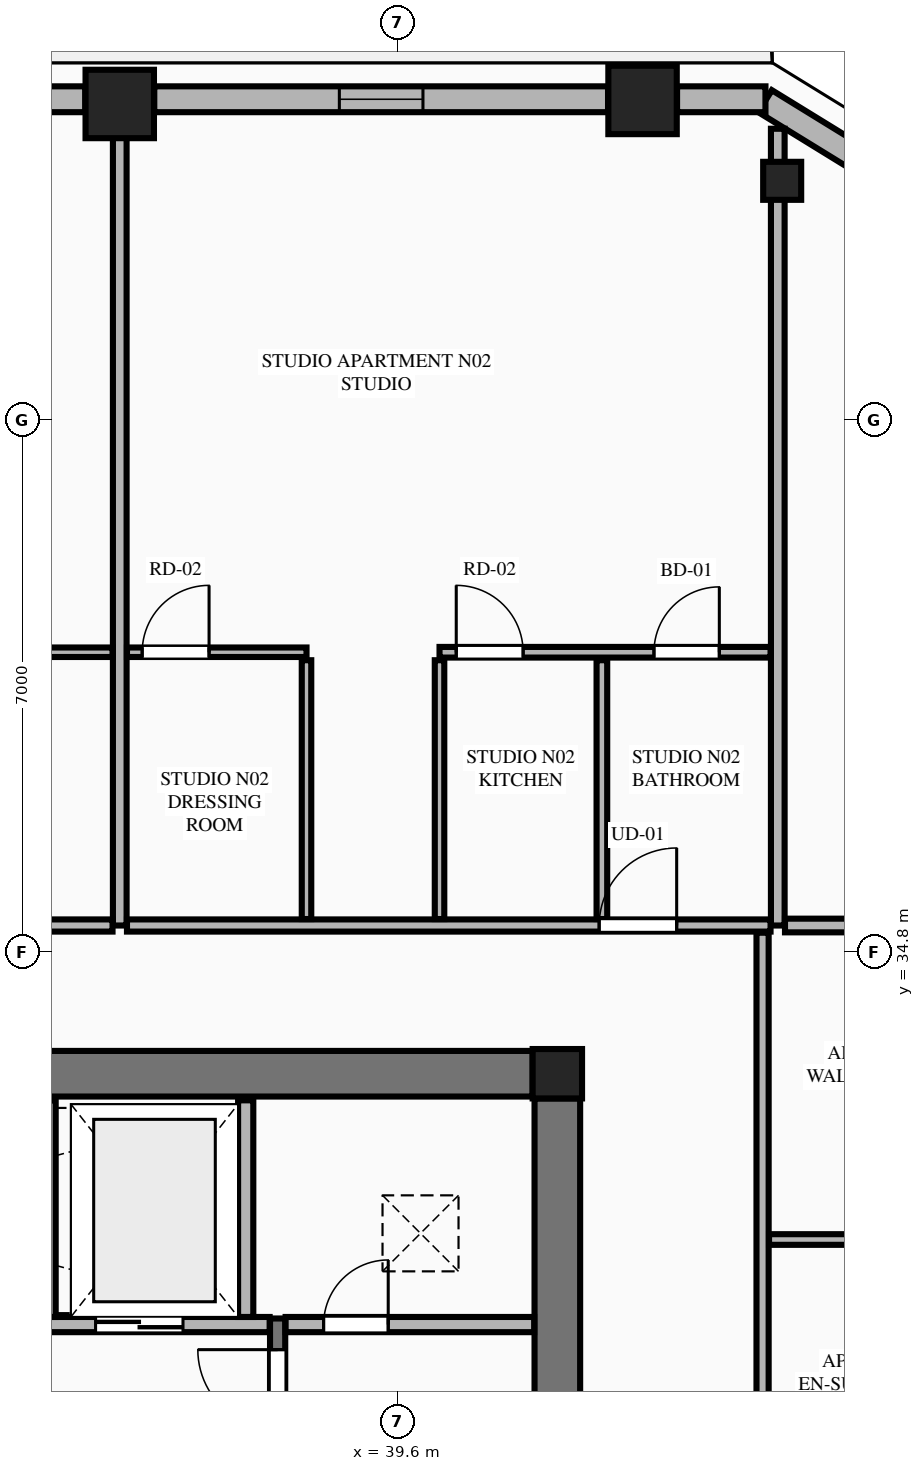
"""IFC4 building model, lengths in metres.
Left out: names, types, materials, properties, quantities, classifications, styles, units other than length and angle.
Written with IfcOpenShell. Run it as: python <this file> out.ifc"""

import sys

from ifc_helpers import new_model, si_unit, direction, frame, frame_2d, origin, origin_2d, place, context, subcontext, project, spatial, rectangle, extrude, element, fill, save


model = new_model("IFC4")
c1 = context("Model", 3, precision=1e-05, world=origin(), true_north=direction((0.0, 1.0)))
c2 = subcontext(c1, "Body", "Model", "MODEL_VIEW")
j1 = project(units=[si_unit("LENGTHUNIT", "METRE"), si_unit("PLANEANGLEUNIT", "RADIAN")], contexts=[c1])
p1 = place(None, origin())
s1 = spatial("IfcSite", under=j1, at=p1, CompositionType="ELEMENT")
p2 = place(p1, origin())
s2 = spatial("IfcBuilding", under=s1, at=p2, CompositionType="ELEMENT")
p3 = place(p2, frame((0.0, 0.0, 175.45)))
s3 = spatial("IfcBuildingStorey", under=s2, at=p3, CompositionType="ELEMENT", Elevation=175.45)
p4 = place(p3, frame((41.7, 33.2, 0.0), z_axis=(0.0, 0.0, 1.0), x_axis=(1.0, 0.0, 0.0)))
e1 = element("IfcColumn", 1, at=p4, inside=s3, PredefinedType="COLUMN", context=c2, shape_type="SweptSolid", body=[
    extrude(rectangle(XDim=0.65, YDim=0.65, at=origin_2d()), origin(), (0.0, 0.0, 1.0), 3.55),
])
p5 = place(p3, frame((23.425, 33.2, 0.0), z_axis=(0.0, 0.0, 1.0), x_axis=(1.0, 0.0, 0.0)))
e2 = element("IfcWall", 2, at=p5, inside=s3, PredefinedType="SHEAR", context=c2, shape_type="SweptSolid", body=[
    extrude(rectangle(XDim=17.95, YDim=0.6, at=frame_2d((8.975, 0.0))), origin(), (0.0, 0.0, 1.0), 3.35),
])
p6 = place(p3, frame((41.7, 18.925, 0.0), z_axis=(0.0, 0.0, 1.0), x_axis=(0.0, 1.0, 0.0)))
e3 = element("IfcWall", 3, at=p6, inside=s3, PredefinedType="SHEAR", context=c2, shape_type="SweptSolid", body=[
    extrude(rectangle(XDim=13.95, YDim=0.6, at=frame_2d((6.975, 0.0))), origin(), (0.0, 0.0, 1.0), 3.35),
])
p7 = place(p6, frame((2.915, 0.0, 0.0)))
e4 = element("IfcOpeningElement", 4, at=p7, cuts=e3, PredefinedType="OPENING", context=c2, shape_type="SweptSolid", body=[
    extrude(rectangle(XDim=1.22, YDim=2.25, at=frame_2d((0.61, 1.125))), frame((0.0, 0.31, 0.0), z_axis=(0.0, -1.0, 0.0), x_axis=(1.0, 0.0, 0.0)), (0.0, 0.0, 1.0), 0.62),
])
for number, where, z_axis, x_axis in (
    (5, (42.821, 46.011, 0.0), (0.0, 0.0, 1.0), (1.0, 0.0, 0.0)),
    (6, (35.943, 45.958, 0.0), (0.0, 0.0, 1.0), (1.0, 0.0, 0.0)),
):
    element("IfcColumn", number, at=place(p3, frame(where, z_axis=z_axis, x_axis=x_axis)), inside=s3, PredefinedType="COLUMN", context=c2, shape_type="SweptSolid", body=[
        extrude(rectangle(XDim=0.9, YDim=0.9, at=origin_2d()), origin(), (0.0, 0.0, 1.0), 3.55),
    ])
p8 = place(p3, frame((44.658, 44.947, 0.0), z_axis=(0.0, 0.0, 1.0), x_axis=(-0.865230187018, 0.501374833306, 0.0)))
e7 = element("IfcColumn", 7, at=p8, inside=s3, PredefinedType="PILASTER", context=c2, shape_type="SweptSolid", body=[
    extrude(rectangle(XDim=0.5, YDim=0.35, at=origin_2d()), origin(), (0.0, 0.0, 1.0), 3.55),
])
p9 = place(p3, frame((38.02, 23.2, 0.0), z_axis=(0.0, 0.0, 1.0), x_axis=(0.0, 1.0, 0.0)))
e8 = element("IfcWall", 8, at=p9, inside=s3, PredefinedType="SHEAR", context=c2, shape_type="SweptSolid", body=[
    extrude(rectangle(XDim=6.78, YDim=0.2, at=frame_2d((3.39, 0.0))), origin(), (0.0, 0.0, 1.0), 3.55),
])
p10 = place(p9, frame((5.32, 0.0, 0.0)))
e9 = element("IfcOpeningElement", 9, at=p10, cuts=e8, PredefinedType="OPENING", context=c2, shape_type="SweptSolid", body=[
    extrude(rectangle(XDim=1.05, YDim=2.15, at=frame_2d((0.525, 1.075))), frame((0.0, 0.11, 0.0), z_axis=(0.0, -1.0, 0.0), x_axis=(1.0, 0.0, 0.0)), (0.0, 0.0, 1.0), 0.22),
])
p11 = place(p3, frame((34.9, 29.9, 0.0), z_axis=(0.0, 0.0, 1.0), x_axis=(1.0, 0.0, 0.0)))
e10 = element("IfcWall", 10, at=p11, inside=s3, PredefinedType="PLUMBINGWALL", context=c2, shape_type="SweptSolid", body=[
    extrude(rectangle(XDim=3.015, YDim=0.2, at=frame_2d((1.508, 0.0))), origin(), (0.0, 0.0, 1.0), 3.35),
])
p12 = place(p11, frame((0.725, 0.0, 0.0)))
e11 = element("IfcOpeningElement", 11, at=p12, cuts=e10, PredefinedType="OPENING", context=c2, shape_type="SweptSolid", body=[
    extrude(rectangle(XDim=1.15, YDim=2.2, at=frame_2d((0.575, 1.1))), frame((0.0, 0.11, 0.0), z_axis=(0.0, -1.0, 0.0), x_axis=(1.0, 0.0, 0.0)), (0.0, 0.0, 1.0), 0.22),
])
p13 = place(p3, frame((38.125, 29.9, 0.0), z_axis=(0.0, 0.0, 1.0), x_axis=(1.0, 0.0, 0.0)))
e12 = element("IfcWall", 12, at=p13, inside=s3, PredefinedType="PLUMBINGWALL", context=c2, shape_type="SweptSolid", body=[
    extrude(rectangle(XDim=3.27, YDim=0.2, at=frame_2d((1.635, 0.0))), origin(), (0.0, 0.0, 1.0), 3.35),
])
p14 = place(p13, frame((0.5, 0.0, 0.0)))
e13 = element("IfcOpeningElement", 13, at=p14, cuts=e12, PredefinedType="OPENING", context=c2, shape_type="SweptSolid", body=[
    extrude(rectangle(XDim=0.85, YDim=2.05, at=frame_2d((0.425, 1.025))), frame((0.0, 0.11, 0.0), z_axis=(0.0, -1.0, 0.0), x_axis=(1.0, 0.0, 0.0)), (0.0, 0.0, 1.0), 0.22),
])
for number, where, z_axis, x_axis in (
    (14, (35.0, 30.0, 0.0), (0.0, 0.0, 1.0), (0.0, 1.0, 0.0)),
    (15, (37.6, 30.0, 0.0), (0.0, 0.0, 1.0), (0.0, 1.0, 0.0)),
):
    element("IfcWall", number, at=place(p3, frame(where, z_axis=z_axis, x_axis=x_axis)), inside=s3, PredefinedType="PLUMBINGWALL", context=c2, shape_type="SweptSolid", body=[
        extrude(rectangle(XDim=2.85, YDim=0.2, at=frame_2d((1.425, 0.0))), origin(), (0.0, 0.0, 1.0), 3.35),
    ])
p15 = place(p3, frame((45.862, 45.116, 0.0), z_axis=(0.0, 0.0, 1.0), x_axis=(-0.851713271379, 0.524008113828, 0.0)))
e16 = element("IfcWall", 16, at=p15, inside=s3, PredefinedType="STANDARD", context=c2, shape_type="SweptSolid", body=[
    extrude(rectangle(XDim=1.678, YDim=0.34, at=frame_2d((0.839, 0.0))), origin(), (0.0, 0.0, 1.0), 3.35),
])
p16 = place(p3, frame((44.438, 46.02, 0.0), z_axis=(0.0, 0.0, 1.0), x_axis=(-1.0, 0.0, 0.0)))
e17 = element("IfcWall", 17, at=p16, inside=s3, PredefinedType="STANDARD", context=c2, shape_type="SweptSolid", body=[
    extrude(rectangle(XDim=1.163, YDim=0.34, at=frame_2d((0.582, 0.0))), origin(), (0.0, 0.0, 1.0), 3.35),
])
p17 = place(p3, frame((42.367, 46.02, 0.0), z_axis=(0.0, 0.0, 1.0), x_axis=(-1.0, 0.0, 0.0)))
e18 = element("IfcWall", 18, at=p17, inside=s3, PredefinedType="STANDARD", context=c2, shape_type="SweptSolid", body=[
    extrude(rectangle(XDim=5.97, YDim=0.34, at=frame_2d((2.985, 0.0))), origin(), (0.0, 0.0, 1.0), 2.883),
])
p18 = place(p17, frame((2.435, 0.0, 0.75)))
e19 = element("IfcOpeningElement", 19, at=p18, cuts=e18, PredefinedType="OPENING", context=c2, shape_type="SweptSolid", body=[
    extrude(rectangle(XDim=1.1, YDim=1.983, at=frame_2d((0.55, 0.991))), frame((0.0, 0.18, 0.0), z_axis=(0.0, -1.0, 0.0), x_axis=(1.0, 0.0, 0.0)), (0.0, 0.0, 1.0), 0.36),
])
p19 = place(p3, frame((35.489, 46.02, 0.0), z_axis=(0.0, 0.0, 1.0), x_axis=(-1.0, 0.0, 0.0)))
e20 = element("IfcWall", 20, at=p19, inside=s3, PredefinedType="STANDARD", context=c2, shape_type="SweptSolid", body=[
    extrude(rectangle(XDim=6.178, YDim=0.34, at=frame_2d((3.089, 0.0))), origin(), (0.0, 0.0, 1.0), 2.883),
])
p20 = place(p19, frame((1.668, 0.0, 0.0)))
e21 = element("IfcOpeningElement", 21, at=p20, cuts=e20, PredefinedType="OPENING", context=c2, shape_type="SweptSolid", body=[
    extrude(rectangle(XDim=1.1, YDim=2.25, at=frame_2d((0.55, 1.125))), frame((0.0, 0.18, 0.0), z_axis=(0.0, -1.0, 0.0), x_axis=(1.0, 0.0, 0.0)), (0.0, 0.0, 1.0), 0.36),
])
p21 = place(p19, frame((4.872, 0.0, 0.75)))
e22 = element("IfcOpeningElement", 22, at=p21, cuts=e20, PredefinedType="OPENING", context=c2, shape_type="SweptSolid", body=[
    extrude(rectangle(XDim=1.086, YDim=1.983, at=frame_2d((0.543, 0.991))), frame((0.0, 0.18, 0.0), z_axis=(0.0, -1.0, 0.0), x_axis=(1.0, 0.0, 0.0)), (0.0, 0.0, 1.0), 0.36),
])
p22 = place(p3, frame((35.943, 35.15, 0.0), z_axis=(0.0, 0.0, 1.0), x_axis=(0.0, 1.0, 0.0)))
e23 = element("IfcWall", 23, at=p22, inside=s3, PredefinedType="PARTITIONING", context=c2, shape_type="SweptSolid", body=[
    extrude(rectangle(XDim=10.695, YDim=0.18, at=frame_2d((5.348, 0.0))), origin(), (0.0, 0.0, 1.0), 2.807),
])
p23 = place(p3, frame((44.6, 35.15, 0.0), z_axis=(0.0, 0.0, 1.0), x_axis=(0.0, 1.0, 0.0)))
e24 = element("IfcWall", 24, at=p23, inside=s3, PredefinedType="PARTITIONING", context=c2, shape_type="SweptSolid", body=[
    extrude(rectangle(XDim=10.482, YDim=0.18, at=frame_2d((5.241, 0.0))), origin(), (0.0, 0.0, 1.0), 3.35),
])
p24 = place(p3, frame((20.295, 35.15, 0.0), z_axis=(0.0, 0.0, 1.0), x_axis=(1.0, 0.0, 0.0)))
e25 = element("IfcWall", 25, at=p24, inside=s3, PredefinedType="PARTITIONING", context=c2, shape_type="SweptSolid", body=[
    extrude(rectangle(XDim=15.553, YDim=0.16, at=frame_2d((7.776, 0.0))), origin(), (0.0, 0.0, 1.0), 3.35),
])
p25 = place(p24, frame((0.405, 0.0, 0.0)))
e26 = element("IfcOpeningElement", 26, at=p25, cuts=e25, PredefinedType="OPENING", context=c2, shape_type="SweptSolid", body=[
    extrude(rectangle(XDim=1.02, YDim=2.25, at=frame_2d((0.51, 1.125))), frame((0.0, 0.09, 0.0), z_axis=(0.0, -1.0, 0.0), x_axis=(1.0, 0.0, 0.0)), (0.0, 0.0, 1.0), 0.18),
])
p26 = place(p3, frame((30.95, 38.745, 0.0), z_axis=(0.0, 0.0, 1.0), x_axis=(1.0, 0.0, 0.0)))
e27 = element("IfcWall", 27, at=p26, inside=s3, PredefinedType="PARTITIONING", context=c2, shape_type="SweptSolid", body=[
    extrude(rectangle(XDim=4.898, YDim=0.125, at=frame_2d((2.449, 0.0))), origin(), (0.0, 0.0, 1.0), 3.35),
])
p27 = place(p26, frame((2.024, 0.0, 0.0)))
e28 = element("IfcOpeningElement", 28, at=p27, cuts=e27, PredefinedType="OPENING", context=c2, shape_type="SweptSolid", body=[
    extrude(rectangle(XDim=0.86, YDim=2.1, at=frame_2d((0.43, 1.05))), frame((0.0, 0.073, 0.0), z_axis=(0.0, -1.0, 0.0), x_axis=(1.0, 0.0, 0.0)), (0.0, 0.0, 1.0), 0.145),
])
p28 = place(p3, frame((36.038, 35.15, 0.0), z_axis=(0.0, 0.0, 1.0), x_axis=(1.0, 0.0, 0.0)))
e29 = element("IfcWall", 29, at=p28, inside=s3, PredefinedType="PARTITIONING", context=c2, shape_type="SweptSolid", body=[
    extrude(rectangle(XDim=8.467, YDim=0.16, at=frame_2d((4.233, 0.0))), origin(), (0.0, 0.0, 1.0), 3.35),
])
p29 = place(p28, frame((6.212, 0.0, 0.0)))
e30 = element("IfcOpeningElement", 30, at=p29, cuts=e29, PredefinedType="OPENING", context=c2, shape_type="SweptSolid", body=[
    extrude(rectangle(XDim=1.02, YDim=2.25, at=frame_2d((0.51, 1.125))), frame((0.0, 0.09, 0.0), z_axis=(0.0, -1.0, 0.0), x_axis=(1.0, 0.0, 0.0)), (0.0, 0.0, 1.0), 0.18),
])
p30 = place(p3, frame((40.15, 35.235, 0.0), z_axis=(0.0, 0.0, 1.0), x_axis=(0.0, 1.0, 0.0)))
e31 = element("IfcWall", 31, at=p30, inside=s3, PredefinedType="PARTITIONING", context=c2, shape_type="SweptSolid", body=[
    extrude(rectangle(XDim=3.405, YDim=0.125, at=frame_2d((1.702, 0.0))), origin(), (0.0, 0.0, 1.0), 3.35),
])
p31 = place(p3, frame((40.15, 38.745, 0.0), z_axis=(0.0, 0.0, 1.0), x_axis=(1.0, 0.0, 0.0)))
e32 = element("IfcWall", 32, at=p31, inside=s3, PredefinedType="PLUMBINGWALL", context=c2, shape_type="SweptSolid", body=[
    extrude(rectangle(XDim=4.355, YDim=0.14, at=frame_2d((2.177, 0.0))), origin(), (0.0, 0.0, 1.0), 3.35),
])
p32 = place(p31, frame((2.821, 0.0, 0.0)))
e33 = element("IfcOpeningElement", 33, at=p32, cuts=e32, PredefinedType="OPENING", context=c2, shape_type="SweptSolid", body=[
    extrude(rectangle(XDim=0.86, YDim=2.1, at=frame_2d((0.43, 1.05))), frame((0.0, 0.08, 0.0), z_axis=(0.0, -1.0, 0.0), x_axis=(1.0, 0.0, 0.0)), (0.0, 0.0, 1.0), 0.16),
])
p33 = place(p31, frame((0.22, 0.0, 0.0)))
e34 = element("IfcOpeningElement", 34, at=p33, cuts=e32, PredefinedType="OPENING", context=c2, shape_type="SweptSolid", body=[
    extrude(rectangle(XDim=0.88, YDim=2.15, at=frame_2d((0.44, 1.075))), frame((0.0, 0.08, 0.0), z_axis=(0.0, -1.0, 0.0), x_axis=(1.0, 0.0, 0.0)), (0.0, 0.0, 1.0), 0.16),
])
p34 = place(p3, frame((42.286, 35.235, 0.0), z_axis=(0.0, 0.0, 1.0), x_axis=(0.0, 1.0, 0.0)))
e35 = element("IfcWall", 35, at=p34, inside=s3, PredefinedType="PLUMBINGWALL", context=c2, shape_type="SweptSolid", body=[
    extrude(rectangle(XDim=3.405, YDim=0.14, at=frame_2d((1.702, 0.0))), origin(), (0.0, 0.0, 1.0), 2.807),
])
p35 = place(p3, frame((38.4, 35.235, 0.0), z_axis=(0.0, 0.0, 1.0), x_axis=(0.0, 1.0, 0.0)))
e36 = element("IfcWall", 36, at=p35, inside=s3, PredefinedType="PARTITIONING", context=c2, shape_type="SweptSolid", body=[
    extrude(rectangle(XDim=3.405, YDim=0.125, at=frame_2d((1.702, 0.0))), origin(), (0.0, 0.0, 1.0), 3.35),
])
p36 = place(p3, frame((36.038, 38.745, 0.0), z_axis=(0.0, 0.0, 1.0), x_axis=(1.0, 0.0, 0.0)))
e37 = element("IfcWall", 37, at=p36, inside=s3, PredefinedType="PARTITIONING", context=c2, shape_type="SweptSolid", body=[
    extrude(rectangle(XDim=2.362, YDim=0.125, at=frame_2d((1.181, 0.0))), origin(), (0.0, 0.0, 1.0), 3.35),
])
p37 = place(p36, frame((0.2, 0.0, 0.0)))
e38 = element("IfcOpeningElement", 38, at=p37, cuts=e37, PredefinedType="OPENING", context=c2, shape_type="SweptSolid", body=[
    extrude(rectangle(XDim=0.88, YDim=2.15, at=frame_2d((0.44, 1.075))), frame((0.0, 0.073, 0.0), z_axis=(0.0, -1.0, 0.0), x_axis=(1.0, 0.0, 0.0)), (0.0, 0.0, 1.0), 0.145),
])
p38 = place(p3, frame((44.695, 35.15, 0.0), z_axis=(0.0, 0.0, 1.0), x_axis=(1.0, 0.0, 0.0)))
e39 = element("IfcWall", 39, at=p38, inside=s3, PredefinedType="PARTITIONING", context=c2, shape_type="SweptSolid", body=[
    extrude(rectangle(XDim=5.995, YDim=0.18, at=frame_2d((2.998, 0.0))), origin(), (0.0, 0.0, 1.0), 3.35),
])
p39 = place(p3, frame((44.4, 16.345, 0.0), z_axis=(0.0, 0.0, 1.0), x_axis=(0.0, 1.0, 0.0)))
e40 = element("IfcWall", 40, at=p39, inside=s3, PredefinedType="PARTITIONING", context=c2, shape_type="SweptSolid", body=[
    extrude(rectangle(XDim=18.71, YDim=0.16, at=frame_2d((9.355, 0.0))), origin(), (0.0, 0.0, 1.0), 3.35),
])
p40 = place(p39, frame((0.45, 0.0, 0.0)))
e41 = element("IfcOpeningElement", 41, at=p40, cuts=e40, PredefinedType="OPENING", context=c2, shape_type="SweptSolid", body=[
    extrude(rectangle(XDim=1.02, YDim=2.25, at=frame_2d((0.51, 1.125))), frame((0.0, 0.09, 0.0), z_axis=(0.0, -1.0, 0.0), x_axis=(1.0, 0.0, 0.0)), (0.0, 0.0, 1.0), 0.18),
])
p41 = place(p3, frame((44.485, 31.019, 0.0), z_axis=(0.0, 0.0, 1.0), x_axis=(1.0, 0.0, 0.0)))
e42 = element("IfcWall", 42, at=p41, inside=s3, PredefinedType="PLUMBINGWALL", context=c2, shape_type="SweptSolid", body=[
    extrude(rectangle(XDim=3.68, YDim=0.14, at=frame_2d((1.84, 0.0))), origin(), (0.0, 0.0, 1.0), 3.35),
])
p42 = place(p10, origin())
e43 = element("IfcDoor", 43, at=p42, inside=s3, OperationType="SINGLE_SWING_RIGHT", PredefinedType="DOOR", context=c2, shape_type="SweptSolid", body=[
    extrude(rectangle(XDim=1.05, YDim=2.15, at=frame_2d((0.525, 1.075))), frame((0.0, 0.025, 0.0), z_axis=(0.0, -1.0, 0.0), x_axis=(1.0, 0.0, 0.0)), (0.0, 0.0, 1.0), 0.05),
])
fill(e9, e43)
p43 = place(p14, origin())
e44 = element("IfcDoor", 44, at=p43, inside=s3, OperationType="SINGLE_SWING_RIGHT", PredefinedType="DOOR", context=c2, shape_type="SweptSolid", body=[
    extrude(rectangle(XDim=0.85, YDim=2.05, at=frame_2d((0.425, 1.025))), frame((0.0, 0.025, 0.0), z_axis=(0.0, -1.0, 0.0), x_axis=(1.0, 0.0, 0.0)), (0.0, 0.0, 1.0), 0.05),
])
fill(e13, e44)
p44 = place(p12, origin())
e45 = element("IfcDoor", 45, at=p44, inside=s3, OperationType="DOUBLE_DOOR_SLIDING", PredefinedType="DOOR", context=c2, shape_type="SweptSolid", body=[
    extrude(rectangle(XDim=1.15, YDim=2.2, at=frame_2d((0.575, 1.1))), frame((0.0, 0.025, 0.0), z_axis=(0.0, -1.0, 0.0), x_axis=(1.0, 0.0, 0.0)), (0.0, 0.0, 1.0), 0.05),
])
fill(e11, e45)
p45 = place(p18, origin())
e46 = element("IfcWindow", 46, at=p45, inside=s3, PartitioningType="SINGLE_PANEL", PredefinedType="WINDOW", context=c2, shape_type="SweptSolid", body=[
    extrude(rectangle(XDim=1.1, YDim=1.983, at=frame_2d((0.55, 0.991))), frame((0.0, 0.03, 0.0), z_axis=(0.0, -1.0, 0.0), x_axis=(1.0, 0.0, 0.0)), (0.0, 0.0, 1.0), 0.06),
])
fill(e19, e46)
p46 = place(p37, origin())
e47 = element("IfcDoor", 47, at=p46, inside=s3, OperationType="SINGLE_SWING_RIGHT", PredefinedType="DOOR", context=c2, shape_type="SweptSolid", body=[
    extrude(rectangle(XDim=0.88, YDim=2.15, at=frame_2d((0.44, 1.075))), frame((0.0, 0.025, 0.0), z_axis=(0.0, -1.0, 0.0), x_axis=(1.0, 0.0, 0.0)), (0.0, 0.0, 1.0), 0.05),
])
fill(e38, e47)
p47 = place(p32, origin())
e48 = element("IfcDoor", 48, at=p47, inside=s3, OperationType="SINGLE_SWING_RIGHT", PredefinedType="DOOR", context=c2, shape_type="SweptSolid", body=[
    extrude(rectangle(XDim=0.86, YDim=2.1, at=frame_2d((0.43, 1.05))), frame((0.0, 0.025, 0.0), z_axis=(0.0, -1.0, 0.0), x_axis=(1.0, 0.0, 0.0)), (0.0, 0.0, 1.0), 0.05),
])
fill(e33, e48)
p48 = place(p29, origin())
e49 = element("IfcDoor", 49, at=p48, inside=s3, OperationType="SINGLE_SWING_RIGHT", PredefinedType="DOOR", context=c2, shape_type="SweptSolid", body=[
    extrude(rectangle(XDim=1.02, YDim=2.25, at=frame_2d((0.51, 1.125))), frame((0.0, 0.025, 0.0), z_axis=(0.0, -1.0, 0.0), x_axis=(1.0, 0.0, 0.0)), (0.0, 0.0, 1.0), 0.05),
])
fill(e30, e49)
p49 = place(p33, origin())
e50 = element("IfcDoor", 50, at=p49, inside=s3, OperationType="SINGLE_SWING_LEFT", PredefinedType="DOOR", context=c2, shape_type="SweptSolid", body=[
    extrude(rectangle(XDim=0.88, YDim=2.15, at=frame_2d((0.44, 1.075))), frame((0.0, 0.025, 0.0), z_axis=(0.0, -1.0, 0.0), x_axis=(1.0, 0.0, 0.0)), (0.0, 0.0, 1.0), 0.05),
])
fill(e34, e50)
save(model, sys.argv[1])
